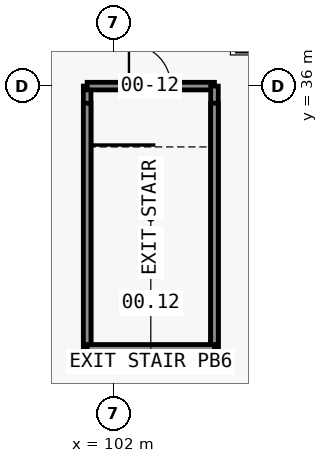
"""IFC4 building model, lengths in metres.
Left out: names, types, materials, properties, quantities, classifications, styles, units other than length and angle.
Written with IfcOpenShell. Run it as: python <this file> out.ifc"""

import sys

from ifc_helpers import new_model, si_unit, direction, frame, frame_2d, origin, place, context, subcontext, project, spatial, rectangle, extrude, element, fill, save


model = new_model("IFC4")
c1 = context("Model", 3, precision=1e-05, world=origin(), true_north=direction((0.0, 1.0)))
c2 = subcontext(c1, "Body", "Model", "MODEL_VIEW")
j1 = project(units=[si_unit("LENGTHUNIT", "METRE"), si_unit("PLANEANGLEUNIT", "RADIAN")], contexts=[c1])
p1 = place(None, origin())
s1 = spatial("IfcSite", under=j1, at=p1, CompositionType="ELEMENT")
p2 = place(p1, origin())
s2 = spatial("IfcBuilding", under=s1, at=p2, CompositionType="ELEMENT")
p3 = place(p2, origin())
s3 = spatial("IfcBuildingStorey", under=s2, at=p3, CompositionType="ELEMENT", Elevation=0.0)
p4 = place(p3, frame((101.3, 29.1, 0.0), z_axis=(0.0, 0.0, 1.0), x_axis=(0.0, 1.0, 0.0)))
e1 = element("IfcWall", 1, at=p4, inside=s3, PredefinedType="PARTITIONING", context=c2, shape_type="SweptSolid", body=[
    extrude(rectangle(XDim=6.9, YDim=0.2, at=frame_2d((3.45, 0.0))), origin(), (0.0, 0.0, 1.0), 6.95),
])
p5 = place(p3, frame((101.3, 36.0, 0.0), z_axis=(0.0, 0.0, 1.0), x_axis=(1.0, 0.0, 0.0)))
e2 = element("IfcWall", 2, at=p5, inside=s3, PredefinedType="PARTITIONING", context=c2, shape_type="SweptSolid", body=[
    extrude(rectangle(XDim=3.35, YDim=0.2, at=frame_2d((1.675, 0.0))), origin(), (0.0, 0.0, 1.0), 6.95),
])
p6 = place(p5, frame((1.1, 0.0, 0.0)))
e3 = element("IfcOpeningElement", 3, at=p6, cuts=e2, PredefinedType="OPENING", context=c2, shape_type="SweptSolid", body=[
    extrude(rectangle(XDim=1.1, YDim=2.1, at=frame_2d((0.55, 1.05))), frame((0.0, 0.11, 0.0), z_axis=(0.0, -1.0, 0.0), x_axis=(1.0, 0.0, 0.0)), (0.0, 0.0, 1.0), 0.22),
])
p7 = place(p3, frame((104.65, 36.0, 0.0), z_axis=(0.0, 0.0, 1.0), x_axis=(0.0, -1.0, 0.0)))
e4 = element("IfcWall", 4, at=p7, inside=s3, PredefinedType="PARTITIONING", context=c2, shape_type="SweptSolid", body=[
    extrude(rectangle(XDim=6.9, YDim=0.2, at=frame_2d((3.45, 0.0))), origin(), (0.0, 0.0, 1.0), 6.95),
])
p8 = place(p3, frame((104.65, 29.1, 0.0), z_axis=(0.0, 0.0, 1.0), x_axis=(-1.0, 0.0, 0.0)))
e5 = element("IfcWall", 5, at=p8, inside=s3, PredefinedType="PARTITIONING", context=c2, shape_type="SweptSolid", body=[
    extrude(rectangle(XDim=3.35, YDim=0.2, at=frame_2d((1.675, 0.0))), origin(), (0.0, 0.0, 1.0), 7.65),
])
for number, where, z_axis, x_axis in (
    (6, (101.3, 29.1, 6.95), (0.0, 0.0, 1.0), (0.0, 1.0, 0.0)),
    (7, (104.65, 35.55, 6.95), (0.0, 0.0, 1.0), (0.0, -1.0, 0.0)),
):
    element("IfcWall", number, at=place(p3, frame(where, z_axis=z_axis, x_axis=x_axis)), inside=s3, PredefinedType="PARTITIONING", context=c2, shape_type="SweptSolid", body=[
        extrude(rectangle(XDim=6.45, YDim=0.2, at=frame_2d((3.225, 0.0))), origin(), (0.0, 0.0, 1.0), 0.7),
    ])
p9 = place(p6, origin())
e8 = element("IfcDoor", 8, at=p9, inside=s3, OperationType="SINGLE_SWING_LEFT", PredefinedType="DOOR", context=c2, shape_type="SweptSolid", body=[
    extrude(rectangle(XDim=1.1, YDim=2.1, at=frame_2d((0.55, 1.05))), frame((0.0, 0.025, 0.0), z_axis=(0.0, -1.0, 0.0), x_axis=(1.0, 0.0, 0.0)), (0.0, 0.0, 1.0), 0.05),
])
fill(e3, e8)
save(model, sys.argv[1])
